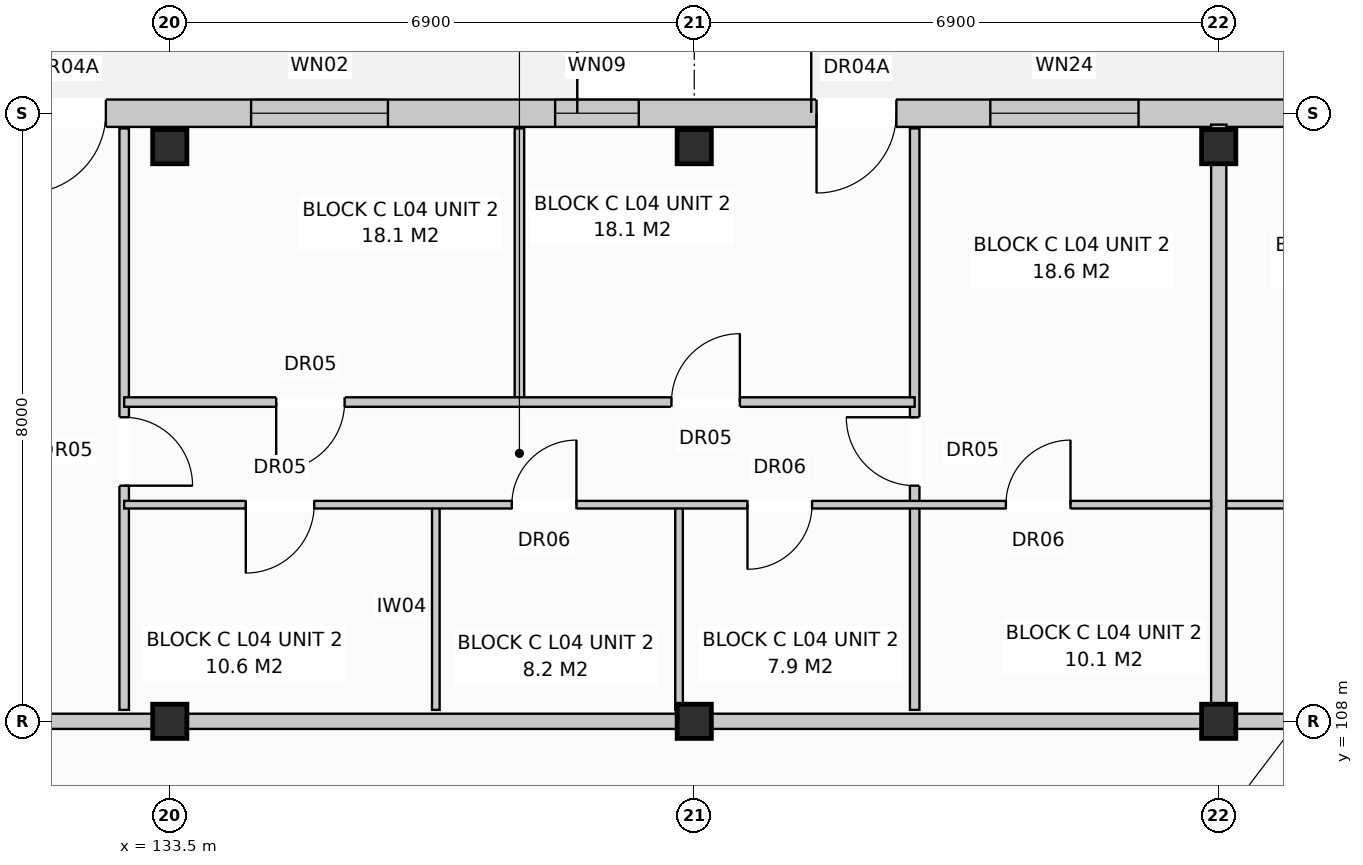
"""IFC4 building model, lengths in metres.
Left out: names, types, materials, properties, quantities, classifications, styles, units other than length and angle.
Written with IfcOpenShell. Run it as: python <this file> out.ifc"""

import sys

from ifc_helpers import new_model, si_unit, direction, frame, frame_2d, origin, origin_with_axes, origin_2d, place, context, subcontext, project, spatial, rectangle, extrude, element, fill, save


model = new_model("IFC4")
c1 = context("Model", 3, precision=1e-05, world=origin(), true_north=direction((0.0, 1.0)))
c2 = subcontext(c1, "Body", "Model", "MODEL_VIEW")
j1 = project(units=[si_unit("LENGTHUNIT", "METRE"), si_unit("PLANEANGLEUNIT", "RADIAN")], contexts=[c1])
p1 = place(None, origin())
s1 = spatial("IfcSite", under=j1, at=p1, CompositionType="ELEMENT")
p2 = place(p1, origin())
s2 = spatial("IfcBuilding", under=s1, at=p2, CompositionType="ELEMENT")
p3 = place(p2, frame((0.0, 0.0, 14.4)))
s3 = spatial("IfcBuildingStorey", under=s2, at=p3, CompositionType="ELEMENT", Elevation=14.4)
for number, where, z_axis, x_axis in (
    (1, (133.5, 108.0, 0.0), (0.0, 0.0, 1.0), (1.0, 0.0, 0.0)),
    (2, (133.5, 115.56, 0.0), (0.0, 0.0, 1.0), (1.0, 0.0, 0.0)),
    (3, (140.4, 108.0, 0.0), (0.0, 0.0, 1.0), (1.0, 0.0, 0.0)),
    (4, (140.4, 115.56, 0.0), (0.0, 0.0, 1.0), (1.0, 0.0, 0.0)),
    (5, (147.3, 108.0, 0.0), (0.0, 0.0, 1.0), (1.0, 0.0, 0.0)),
    (6, (147.3, 115.56, 0.0), (0.0, 0.0, 1.0), (1.0, 0.0, 0.0)),
):
    element("IfcColumn", number, at=place(p3, frame(where, z_axis=z_axis, x_axis=x_axis)), inside=s3, PredefinedType="COLUMN", context=c2, shape_type="SweptSolid", body=[
        extrude(rectangle(XDim=0.45, YDim=0.45, at=origin_2d()), origin(), (0.0, 0.0, 1.0), 3.2),
    ])
p4 = place(p3, frame((112.97, 116.0, 0.0), z_axis=(0.0, 0.0, 1.0), x_axis=(1.0, 0.0, 0.0)))
e7 = element("IfcWall", 7, at=p4, inside=s3, PredefinedType="STANDARD", context=c2, shape_type="SweptSolid", body=[
    extrude(rectangle(XDim=54.86, YDim=0.36, at=frame_2d((27.43, 0.0))), origin(), (0.0, 0.0, 1.0), 2.94),
])
p5 = place(p4, frame((3.779, 0.0, 0.0)))
e8 = element("IfcOpeningElement", 8, at=p5, cuts=e7, PredefinedType="OPENING", context=c2, shape_type="SweptSolid", body=[
    extrude(rectangle(XDim=1.05, YDim=2.12, at=frame_2d((0.525, 1.06))), frame((0.0, 0.192, 0.0), z_axis=(0.0, -1.0, 0.0), x_axis=(1.0, 0.0, 0.0)), (0.0, 0.0, 1.0), 0.384),
])
p6 = place(p4, frame((18.639, 0.0, 0.0)))
e9 = element("IfcOpeningElement", 9, at=p6, cuts=e7, PredefinedType="OPENING", context=c2, shape_type="SweptSolid", body=[
    extrude(rectangle(XDim=1.05, YDim=2.12, at=frame_2d((0.525, 1.06))), frame((0.0, 0.192, 0.0), z_axis=(0.0, -1.0, 0.0), x_axis=(1.0, 0.0, 0.0)), (0.0, 0.0, 1.0), 0.384),
])
p7 = place(p4, frame((29.039, 0.0, 0.0)))
e10 = element("IfcOpeningElement", 10, at=p7, cuts=e7, PredefinedType="OPENING", context=c2, shape_type="SweptSolid", body=[
    extrude(rectangle(XDim=1.05, YDim=2.12, at=frame_2d((0.525, 1.06))), frame((0.0, 0.192, 0.0), z_axis=(0.0, -1.0, 0.0), x_axis=(1.0, 0.0, 0.0)), (0.0, 0.0, 1.0), 0.384),
])
p8 = place(p4, frame((46.45, 0.0, 0.0)))
e11 = element("IfcOpeningElement", 11, at=p8, cuts=e7, PredefinedType="OPENING", context=c2, shape_type="SweptSolid", body=[
    extrude(rectangle(XDim=1.05, YDim=2.12, at=frame_2d((0.525, 1.06))), frame((0.0, 0.192, 0.0), z_axis=(0.0, -1.0, 0.0), x_axis=(1.0, 0.0, 0.0)), (0.0, 0.0, 1.0), 0.384),
])
p9 = place(p4, frame((1.525, 0.0, 0.8)))
e12 = element("IfcOpeningElement", 12, at=p9, cuts=e7, PredefinedType="OPENING", context=c2, shape_type="SweptSolid", body=[
    extrude(rectangle(XDim=1.95, YDim=1.65, at=frame_2d((0.975, 0.825))), frame((0.0, 0.192, 0.0), z_axis=(0.0, -1.0, 0.0), x_axis=(1.0, 0.0, 0.0)), (0.0, 0.0, 1.0), 0.384),
])
p10 = place(p4, frame((7.65, 0.0, 0.72)))
e13 = element("IfcOpeningElement", 13, at=p10, cuts=e7, PredefinedType="OPENING", context=c2, shape_type="SweptSolid", body=[
    extrude(rectangle(XDim=1.1, YDim=1.5, at=frame_2d((0.55, 0.75))), frame((0.0, 0.192, 0.0), z_axis=(0.0, -1.0, 0.0), x_axis=(1.0, 0.0, 0.0)), (0.0, 0.0, 1.0), 0.384),
])
p11 = place(p4, frame((10.45, 0.0, 0.8)))
e14 = element("IfcOpeningElement", 14, at=p11, cuts=e7, PredefinedType="OPENING", context=c2, shape_type="SweptSolid", body=[
    extrude(rectangle(XDim=1.9, YDim=1.85, at=frame_2d((0.95, 0.925))), frame((0.0, 0.192, 0.0), z_axis=(0.0, -1.0, 0.0), x_axis=(1.0, 0.0, 0.0)), (0.0, 0.0, 1.0), 0.384),
])
p12 = place(p4, frame((15.825, 0.0, 0.8)))
e15 = element("IfcOpeningElement", 15, at=p12, cuts=e7, PredefinedType="OPENING", context=c2, shape_type="SweptSolid", body=[
    extrude(rectangle(XDim=1.95, YDim=1.65, at=frame_2d((0.975, 0.825))), frame((0.0, 0.192, 0.0), z_axis=(0.0, -1.0, 0.0), x_axis=(1.0, 0.0, 0.0)), (0.0, 0.0, 1.0), 0.384),
])
p13 = place(p4, frame((21.6, 0.0, 0.8)))
e16 = element("IfcOpeningElement", 16, at=p13, cuts=e7, PredefinedType="OPENING", context=c2, shape_type="SweptSolid", body=[
    extrude(rectangle(XDim=1.8, YDim=1.7, at=frame_2d((0.9, 0.85))), frame((0.0, 0.192, 0.0), z_axis=(0.0, -1.0, 0.0), x_axis=(1.0, 0.0, 0.0)), (0.0, 0.0, 1.0), 0.384),
])
p14 = place(p4, frame((25.6, 0.0, 0.72)))
e17 = element("IfcOpeningElement", 17, at=p14, cuts=e7, PredefinedType="OPENING", context=c2, shape_type="SweptSolid", body=[
    extrude(rectangle(XDim=1.1, YDim=1.5, at=frame_2d((0.55, 0.75))), frame((0.0, 0.192, 0.0), z_axis=(0.0, -1.0, 0.0), x_axis=(1.0, 0.0, 0.0)), (0.0, 0.0, 1.0), 0.384),
])
p15 = place(p4, frame((31.325, 0.0, 0.8)))
e18 = element("IfcOpeningElement", 18, at=p15, cuts=e7, PredefinedType="OPENING", context=c2, shape_type="SweptSolid", body=[
    extrude(rectangle(XDim=1.95, YDim=1.65, at=frame_2d((0.975, 0.825))), frame((0.0, 0.192, 0.0), z_axis=(0.0, -1.0, 0.0), x_axis=(1.0, 0.0, 0.0)), (0.0, 0.0, 1.0), 0.384),
])
p16 = place(p4, frame((35.6, 0.0, 0.8)))
e19 = element("IfcOpeningElement", 19, at=p16, cuts=e7, PredefinedType="OPENING", context=c2, shape_type="SweptSolid", body=[
    extrude(rectangle(XDim=1.8, YDim=1.7, at=frame_2d((0.9, 0.85))), frame((0.0, 0.192, 0.0), z_axis=(0.0, -1.0, 0.0), x_axis=(1.0, 0.0, 0.0)), (0.0, 0.0, 1.0), 0.384),
])
p17 = place(p4, frame((39.25, 0.0, 0.72)))
e20 = element("IfcOpeningElement", 20, at=p17, cuts=e7, PredefinedType="OPENING", context=c2, shape_type="SweptSolid", body=[
    extrude(rectangle(XDim=1.1, YDim=1.5, at=frame_2d((0.55, 0.75))), frame((0.0, 0.192, 0.0), z_axis=(0.0, -1.0, 0.0), x_axis=(1.0, 0.0, 0.0)), (0.0, 0.0, 1.0), 0.384),
])
p18 = place(p4, frame((44.225, 0.0, 0.8)))
e21 = element("IfcOpeningElement", 21, at=p18, cuts=e7, PredefinedType="OPENING", context=c2, shape_type="SweptSolid", body=[
    extrude(rectangle(XDim=1.95, YDim=1.65, at=frame_2d((0.975, 0.825))), frame((0.0, 0.192, 0.0), z_axis=(0.0, -1.0, 0.0), x_axis=(1.0, 0.0, 0.0)), (0.0, 0.0, 1.0), 0.384),
])
p19 = place(p4, frame((49.2, 0.0, 0.8)))
e22 = element("IfcOpeningElement", 22, at=p19, cuts=e7, PredefinedType="OPENING", context=c2, shape_type="SweptSolid", body=[
    extrude(rectangle(XDim=1.8, YDim=1.7, at=frame_2d((0.9, 0.85))), frame((0.0, 0.192, 0.0), z_axis=(0.0, -1.0, 0.0), x_axis=(1.0, 0.0, 0.0)), (0.0, 0.0, 1.0), 0.384),
])
p20 = place(p4, frame((52.95, 0.0, 0.72)))
e23 = element("IfcOpeningElement", 23, at=p20, cuts=e7, PredefinedType="OPENING", context=c2, shape_type="SweptSolid", body=[
    extrude(rectangle(XDim=1.1, YDim=1.5, at=frame_2d((0.55, 0.75))), frame((0.0, 0.192, 0.0), z_axis=(0.0, -1.0, 0.0), x_axis=(1.0, 0.0, 0.0)), (0.0, 0.0, 1.0), 0.384),
])
p21 = place(p3, frame((147.3, 108.15, 0.0), z_axis=(0.0, 0.0, 1.0), x_axis=(0.0, 1.0, 0.0)))
e24 = element("IfcWall", 24, at=p21, inside=s3, PredefinedType="PARTITIONING", context=c2, shape_type="SweptSolid", body=[
    extrude(rectangle(XDim=7.7, YDim=0.2, at=frame_2d((3.85, 0.0))), origin(), (0.0, 0.0, 1.0), 2.94),
])
p22 = place(p3, frame((126.6, 108.0, 0.0), z_axis=(0.0, 0.0, 1.0), x_axis=(1.0, 0.0, 0.0)))
e25 = element("IfcWall", 25, at=p22, inside=s3, PredefinedType="PARTITIONING", context=c2, shape_type="SweptSolid", body=[
    extrude(rectangle(XDim=20.7, YDim=0.2, at=frame_2d((10.35, 0.0))), origin(), (0.0, 0.0, 1.0), 2.38),
])
p23 = place(p22, frame((2.4, 0.0, 0.0)))
e26 = element("IfcOpeningElement", 26, at=p23, cuts=e25, PredefinedType="OPENING", context=c2, shape_type="SweptSolid", body=[
    extrude(rectangle(XDim=0.95, YDim=2.15, at=frame_2d((0.475, 1.075))), frame((0.0, 0.112, 0.0), z_axis=(0.0, -1.0, 0.0), x_axis=(1.0, 0.0, 0.0)), (0.0, 0.0, 1.0), 0.224),
])
p24 = place(p3, frame((132.9, 108.15, 0.0), z_axis=(0.0, 0.0, 1.0), x_axis=(0.0, 1.0, 0.0)))
e27 = element("IfcWall", 27, at=p24, inside=s3, PredefinedType="PARTITIONING", context=c2, shape_type="SweptSolid", body=[
    extrude(rectangle(XDim=7.65, YDim=0.125, at=frame_2d((3.825, 0.0))), origin(), (0.0, 0.0, 1.0), 2.94),
])
p25 = place(p24, frame((2.95, 0.0, 0.0)))
e28 = element("IfcOpeningElement", 28, at=p25, cuts=e27, PredefinedType="OPENING", context=c2, shape_type="SweptSolid", body=[
    extrude(rectangle(XDim=0.9, YDim=2.1, at=frame_2d((0.45, 1.05))), frame((0.0, 0.074, 0.0), z_axis=(0.0, -1.0, 0.0), x_axis=(1.0, 0.0, 0.0)), (0.0, 0.0, 1.0), 0.149),
])
for number, where, z_axis, x_axis in (
    (29, (137.0, 108.15, 0.0), (0.0, 0.0, 1.0), (0.0, 1.0, 0.0)),
    (30, (140.2, 108.15, 0.0), (0.0, 0.0, 1.0), (0.0, 1.0, 0.0)),
):
    element("IfcWall", number, at=place(p3, frame(where, z_axis=z_axis, x_axis=x_axis)), inside=s3, PredefinedType="PARTITIONING", context=c2, shape_type="SweptSolid", body=[
        extrude(rectangle(XDim=2.7, YDim=0.1, at=frame_2d((1.35, 0.0))), origin(), (0.0, 0.0, 1.0), 2.94),
    ])
p26 = place(p3, frame((138.1, 112.2, 0.0), z_axis=(0.0, 0.0, 1.0), x_axis=(0.0, 1.0, 0.0)))
e31 = element("IfcWall", 31, at=p26, inside=s3, PredefinedType="PARTITIONING", context=c2, shape_type="SweptSolid", body=[
    extrude(rectangle(XDim=3.6, YDim=0.125, at=frame_2d((1.8, 0.0))), origin(), (0.0, 0.0, 1.0), 2.94),
])
p27 = place(p3, frame((143.3, 108.15, 0.0), z_axis=(0.0, 0.0, 1.0), x_axis=(0.0, 1.0, 0.0)))
e32 = element("IfcWall", 32, at=p27, inside=s3, PredefinedType="PARTITIONING", context=c2, shape_type="SweptSolid", body=[
    extrude(rectangle(XDim=7.65, YDim=0.125, at=frame_2d((3.825, 0.0))), origin(), (0.0, 0.0, 1.0), 2.94),
])
p28 = place(p27, frame((2.95, 0.0, 0.0)))
e33 = element("IfcOpeningElement", 33, at=p28, cuts=e32, PredefinedType="OPENING", context=c2, shape_type="SweptSolid", body=[
    extrude(rectangle(XDim=0.9, YDim=2.1, at=frame_2d((0.45, 1.05))), frame((0.0, 0.074, 0.0), z_axis=(0.0, -1.0, 0.0), x_axis=(1.0, 0.0, 0.0)), (0.0, 0.0, 1.0), 0.149),
])
p29 = place(p3, frame((132.9, 110.85, 0.0), z_axis=(0.0, 0.0, 1.0), x_axis=(1.0, 0.0, 0.0)))
e34 = element("IfcWall", 34, at=p29, inside=s3, PredefinedType="PARTITIONING", context=c2, shape_type="SweptSolid", body=[
    extrude(rectangle(XDim=14.3, YDim=0.1, at=frame_2d((7.15, 0.0))), origin(), (0.0, 0.0, 1.0), 2.94),
])
p30 = place(p29, frame((1.6, 0.0, 0.0)))
e35 = element("IfcOpeningElement", 35, at=p30, cuts=e34, PredefinedType="OPENING", context=c2, shape_type="SweptSolid", body=[
    extrude(rectangle(XDim=0.9, YDim=2.1, at=frame_2d((0.45, 1.05))), frame((0.0, 0.062, 0.0), z_axis=(0.0, -1.0, 0.0), x_axis=(1.0, 0.0, 0.0)), (0.0, 0.0, 1.0), 0.124),
])
p31 = place(p29, frame((5.1, 0.0, 0.0)))
e36 = element("IfcOpeningElement", 36, at=p31, cuts=e34, PredefinedType="OPENING", context=c2, shape_type="SweptSolid", body=[
    extrude(rectangle(XDim=0.85, YDim=2.05, at=frame_2d((0.425, 1.025))), frame((0.0, 0.062, 0.0), z_axis=(0.0, -1.0, 0.0), x_axis=(1.0, 0.0, 0.0)), (0.0, 0.0, 1.0), 0.124),
])
p32 = place(p29, frame((8.2, 0.0, 0.0)))
e37 = element("IfcOpeningElement", 37, at=p32, cuts=e34, PredefinedType="OPENING", context=c2, shape_type="SweptSolid", body=[
    extrude(rectangle(XDim=0.85, YDim=2.05, at=frame_2d((0.425, 1.025))), frame((0.0, 0.062, 0.0), z_axis=(0.0, -1.0, 0.0), x_axis=(1.0, 0.0, 0.0)), (0.0, 0.0, 1.0), 0.124),
])
p33 = place(p29, frame((11.6, 0.0, 0.0)))
e38 = element("IfcOpeningElement", 38, at=p33, cuts=e34, PredefinedType="OPENING", context=c2, shape_type="SweptSolid", body=[
    extrude(rectangle(XDim=0.85, YDim=2.05, at=frame_2d((0.425, 1.025))), frame((0.0, 0.062, 0.0), z_axis=(0.0, -1.0, 0.0), x_axis=(1.0, 0.0, 0.0)), (0.0, 0.0, 1.0), 0.124),
])
p34 = place(p3, frame((132.9, 112.2, 0.0), z_axis=(0.0, 0.0, 1.0), x_axis=(1.0, 0.0, 0.0)))
e39 = element("IfcWall", 39, at=p34, inside=s3, PredefinedType="PARTITIONING", context=c2, shape_type="SweptSolid", body=[
    extrude(rectangle(XDim=10.4, YDim=0.125, at=frame_2d((5.2, 0.0))), origin(), (0.0, 0.0, 1.0), 2.94),
])
p35 = place(p34, frame((2.0, 0.0, 0.0)))
e40 = element("IfcOpeningElement", 40, at=p35, cuts=e39, PredefinedType="OPENING", context=c2, shape_type="SweptSolid", body=[
    extrude(rectangle(XDim=0.9, YDim=2.1, at=frame_2d((0.45, 1.05))), frame((0.0, 0.074, 0.0), z_axis=(0.0, -1.0, 0.0), x_axis=(1.0, 0.0, 0.0)), (0.0, 0.0, 1.0), 0.149),
])
p36 = place(p34, frame((7.2, 0.0, 0.0)))
e41 = element("IfcOpeningElement", 41, at=p36, cuts=e39, PredefinedType="OPENING", context=c2, shape_type="SweptSolid", body=[
    extrude(rectangle(XDim=0.9, YDim=2.1, at=frame_2d((0.45, 1.05))), frame((0.0, 0.074, 0.0), z_axis=(0.0, -1.0, 0.0), x_axis=(1.0, 0.0, 0.0)), (0.0, 0.0, 1.0), 0.149),
])
p37 = place(p3, frame((147.3, 108.0, 0.0), z_axis=(0.0, 0.0, 1.0), x_axis=(1.0, 0.0, 0.0)))
e42 = element("IfcWall", 42, at=p37, inside=s3, PredefinedType="PARTITIONING", context=c2, shape_type="SweptSolid", body=[
    extrude(rectangle(XDim=13.8, YDim=0.2, at=frame_2d((6.9, 0.0))), origin(), (0.0, 0.0, 1.0), 2.38),
])
p38 = place(p37, frame((9.6, 0.0, 0.0)))
e43 = element("IfcOpeningElement", 43, at=p38, cuts=e42, PredefinedType="OPENING", context=c2, shape_type="SweptSolid", body=[
    extrude(rectangle(XDim=0.95, YDim=2.15, at=frame_2d((0.475, 1.075))), frame((0.0, 0.112, 0.0), z_axis=(0.0, -1.0, 0.0), x_axis=(1.0, 0.0, 0.0)), (0.0, 0.0, 1.0), 0.224),
])
p39 = place(p3, frame((147.4, 110.85, 0.0), z_axis=(0.0, 0.0, 1.0), x_axis=(1.0, 0.0, 0.0)))
e44 = element("IfcWall", 44, at=p39, inside=s3, PredefinedType="PARTITIONING", context=c2, shape_type="SweptSolid", body=[
    extrude(rectangle(XDim=8.6, YDim=0.1, at=frame_2d((4.3, 0.0))), origin(), (0.0, 0.0, 1.0), 2.94),
])
p40 = place(p39, frame((1.4, 0.0, 0.0)))
e45 = element("IfcOpeningElement", 45, at=p40, cuts=e44, PredefinedType="OPENING", context=c2, shape_type="SweptSolid", body=[
    extrude(rectangle(XDim=0.85, YDim=2.05, at=frame_2d((0.425, 1.025))), frame((0.0, 0.062, 0.0), z_axis=(0.0, -1.0, 0.0), x_axis=(1.0, 0.0, 0.0)), (0.0, 0.0, 1.0), 0.124),
])
p41 = place(p39, frame((4.65, 0.0, 0.0)))
e46 = element("IfcOpeningElement", 46, at=p41, cuts=e44, PredefinedType="OPENING", context=c2, shape_type="SweptSolid", body=[
    extrude(rectangle(XDim=0.85, YDim=2.05, at=frame_2d((0.425, 1.025))), frame((0.0, 0.062, 0.0), z_axis=(0.0, -1.0, 0.0), x_axis=(1.0, 0.0, 0.0)), (0.0, 0.0, 1.0), 0.124),
])
p42 = place(p39, frame((6.8, 0.0, 0.0)))
e47 = element("IfcOpeningElement", 47, at=p42, cuts=e44, PredefinedType="OPENING", context=c2, shape_type="SweptSolid", body=[
    extrude(rectangle(XDim=0.85, YDim=2.1, at=frame_2d((0.425, 1.05))), frame((0.0, 0.062, 0.0), z_axis=(0.0, -1.0, 0.0), x_axis=(1.0, 0.0, 0.0)), (0.0, 0.0, 1.0), 0.124),
])
p43 = place(p6, frame((1.05, 0.0, 0.0), z_axis=(0.0, 0.0, 1.0), x_axis=(-1.0, 0.0, 0.0)))
e48 = element("IfcDoor", 48, at=p43, inside=s3, OperationType="SINGLE_SWING_LEFT", PredefinedType="DOOR", context=c2, shape_type="SweptSolid", body=[
    extrude(rectangle(XDim=1.05, YDim=2.12, at=frame_2d((0.525, 1.06))), frame((0.0, 0.025, 0.0), z_axis=(0.0, -1.0, 0.0), x_axis=(1.0, 0.0, 0.0)), (0.0, 0.0, 1.0), 0.05),
])
fill(e9, e48)
p44 = place(p7, frame((1.05, 0.0, 0.0), z_axis=(0.0, 0.0, 1.0), x_axis=(-1.0, 0.0, 0.0)))
e49 = element("IfcDoor", 49, at=p44, inside=s3, OperationType="SINGLE_SWING_LEFT", PredefinedType="DOOR", context=c2, shape_type="SweptSolid", body=[
    extrude(rectangle(XDim=1.05, YDim=2.12, at=frame_2d((0.525, 1.06))), frame((0.0, 0.025, 0.0), z_axis=(0.0, -1.0, 0.0), x_axis=(1.0, 0.0, 0.0)), (0.0, 0.0, 1.0), 0.05),
])
fill(e10, e49)
p45 = place(p13, origin_with_axes())
e50 = element("IfcWindow", 50, at=p45, inside=s3, PartitioningType="SINGLE_PANEL", PredefinedType="WINDOW", context=c2, shape_type="SweptSolid", body=[
    extrude(rectangle(XDim=1.8, YDim=1.7, at=frame_2d((0.9, 0.85))), frame((0.0, 0.03, 0.0), z_axis=(0.0, -1.0, 0.0), x_axis=(1.0, 0.0, 0.0)), (0.0, 0.0, 1.0), 0.06),
])
fill(e16, e50)
p46 = place(p14, origin_with_axes())
e51 = element("IfcWindow", 51, at=p46, inside=s3, PartitioningType="SINGLE_PANEL", PredefinedType="WINDOW", context=c2, shape_type="SweptSolid", body=[
    extrude(rectangle(XDim=1.1, YDim=1.5, at=frame_2d((0.55, 0.75))), frame((0.0, 0.03, 0.0), z_axis=(0.0, -1.0, 0.0), x_axis=(1.0, 0.0, 0.0)), (0.0, 0.0, 1.0), 0.06),
])
fill(e17, e51)
p47 = place(p15, origin_with_axes())
e52 = element("IfcWindow", 52, at=p47, inside=s3, PartitioningType="SINGLE_PANEL", PredefinedType="WINDOW", context=c2, shape_type="SweptSolid", body=[
    extrude(rectangle(XDim=1.95, YDim=1.65, at=frame_2d((0.975, 0.825))), frame((0.0, 0.03, 0.0), z_axis=(0.0, -1.0, 0.0), x_axis=(1.0, 0.0, 0.0)), (0.0, 0.0, 1.0), 0.06),
])
fill(e18, e52)
p48 = place(p25, frame((0.9, 0.0, 0.0), z_axis=(0.0, 0.0, 1.0), x_axis=(-1.0, 0.0, 0.0)))
e53 = element("IfcDoor", 53, at=p48, inside=s3, OperationType="SINGLE_SWING_LEFT", PredefinedType="DOOR", context=c2, shape_type="SweptSolid", body=[
    extrude(rectangle(XDim=0.9, YDim=2.1, at=frame_2d((0.45, 1.05))), frame((0.0, 0.025, 0.0), z_axis=(0.0, -1.0, 0.0), x_axis=(1.0, 0.0, 0.0)), (0.0, 0.0, 1.0), 0.05),
])
fill(e28, e53)
p49 = place(p28, origin_with_axes())
e54 = element("IfcDoor", 54, at=p49, inside=s3, OperationType="SINGLE_SWING_RIGHT", PredefinedType="DOOR", context=c2, shape_type="SweptSolid", body=[
    extrude(rectangle(XDim=0.9, YDim=2.1, at=frame_2d((0.45, 1.05))), frame((0.0, 0.025, 0.0), z_axis=(0.0, -1.0, 0.0), x_axis=(1.0, 0.0, 0.0)), (0.0, 0.0, 1.0), 0.05),
])
fill(e33, e54)
p50 = place(p30, frame((0.9, 0.0, 0.0), z_axis=(0.0, 0.0, 1.0), x_axis=(-1.0, 0.0, 0.0)))
e55 = element("IfcDoor", 55, at=p50, inside=s3, OperationType="SINGLE_SWING_LEFT", PredefinedType="DOOR", context=c2, shape_type="SweptSolid", body=[
    extrude(rectangle(XDim=0.9, YDim=2.1, at=frame_2d((0.45, 1.05))), frame((0.0, 0.025, 0.0), z_axis=(0.0, -1.0, 0.0), x_axis=(1.0, 0.0, 0.0)), (0.0, 0.0, 1.0), 0.05),
])
fill(e35, e55)
p51 = place(p31, origin_with_axes())
e56 = element("IfcDoor", 56, at=p51, inside=s3, OperationType="SINGLE_SWING_RIGHT", PredefinedType="DOOR", context=c2, shape_type="SweptSolid", body=[
    extrude(rectangle(XDim=0.85, YDim=2.05, at=frame_2d((0.425, 1.025))), frame((0.0, 0.025, 0.0), z_axis=(0.0, -1.0, 0.0), x_axis=(1.0, 0.0, 0.0)), (0.0, 0.0, 1.0), 0.05),
])
fill(e36, e56)
p52 = place(p32, frame((0.85, 0.0, 0.0), z_axis=(0.0, 0.0, 1.0), x_axis=(-1.0, 0.0, 0.0)))
e57 = element("IfcDoor", 57, at=p52, inside=s3, OperationType="SINGLE_SWING_LEFT", PredefinedType="DOOR", context=c2, shape_type="SweptSolid", body=[
    extrude(rectangle(XDim=0.85, YDim=2.05, at=frame_2d((0.425, 1.025))), frame((0.0, 0.025, 0.0), z_axis=(0.0, -1.0, 0.0), x_axis=(1.0, 0.0, 0.0)), (0.0, 0.0, 1.0), 0.05),
])
fill(e37, e57)
p53 = place(p33, origin_with_axes())
e58 = element("IfcDoor", 58, at=p53, inside=s3, OperationType="SINGLE_SWING_RIGHT", PredefinedType="DOOR", context=c2, shape_type="SweptSolid", body=[
    extrude(rectangle(XDim=0.85, YDim=2.05, at=frame_2d((0.425, 1.025))), frame((0.0, 0.025, 0.0), z_axis=(0.0, -1.0, 0.0), x_axis=(1.0, 0.0, 0.0)), (0.0, 0.0, 1.0), 0.05),
])
fill(e38, e58)
p54 = place(p35, frame((0.9, 0.0, 0.0), z_axis=(0.0, 0.0, 1.0), x_axis=(-1.0, 0.0, 0.0)))
e59 = element("IfcDoor", 59, at=p54, inside=s3, OperationType="SINGLE_SWING_LEFT", PredefinedType="DOOR", context=c2, shape_type="SweptSolid", body=[
    extrude(rectangle(XDim=0.9, YDim=2.1, at=frame_2d((0.45, 1.05))), frame((0.0, 0.025, 0.0), z_axis=(0.0, -1.0, 0.0), x_axis=(1.0, 0.0, 0.0)), (0.0, 0.0, 1.0), 0.05),
])
fill(e40, e59)
p55 = place(p36, origin_with_axes())
e60 = element("IfcDoor", 60, at=p55, inside=s3, OperationType="SINGLE_SWING_RIGHT", PredefinedType="DOOR", context=c2, shape_type="SweptSolid", body=[
    extrude(rectangle(XDim=0.9, YDim=2.1, at=frame_2d((0.45, 1.05))), frame((0.0, 0.025, 0.0), z_axis=(0.0, -1.0, 0.0), x_axis=(1.0, 0.0, 0.0)), (0.0, 0.0, 1.0), 0.05),
])
fill(e41, e60)
save(model, sys.argv[1])
